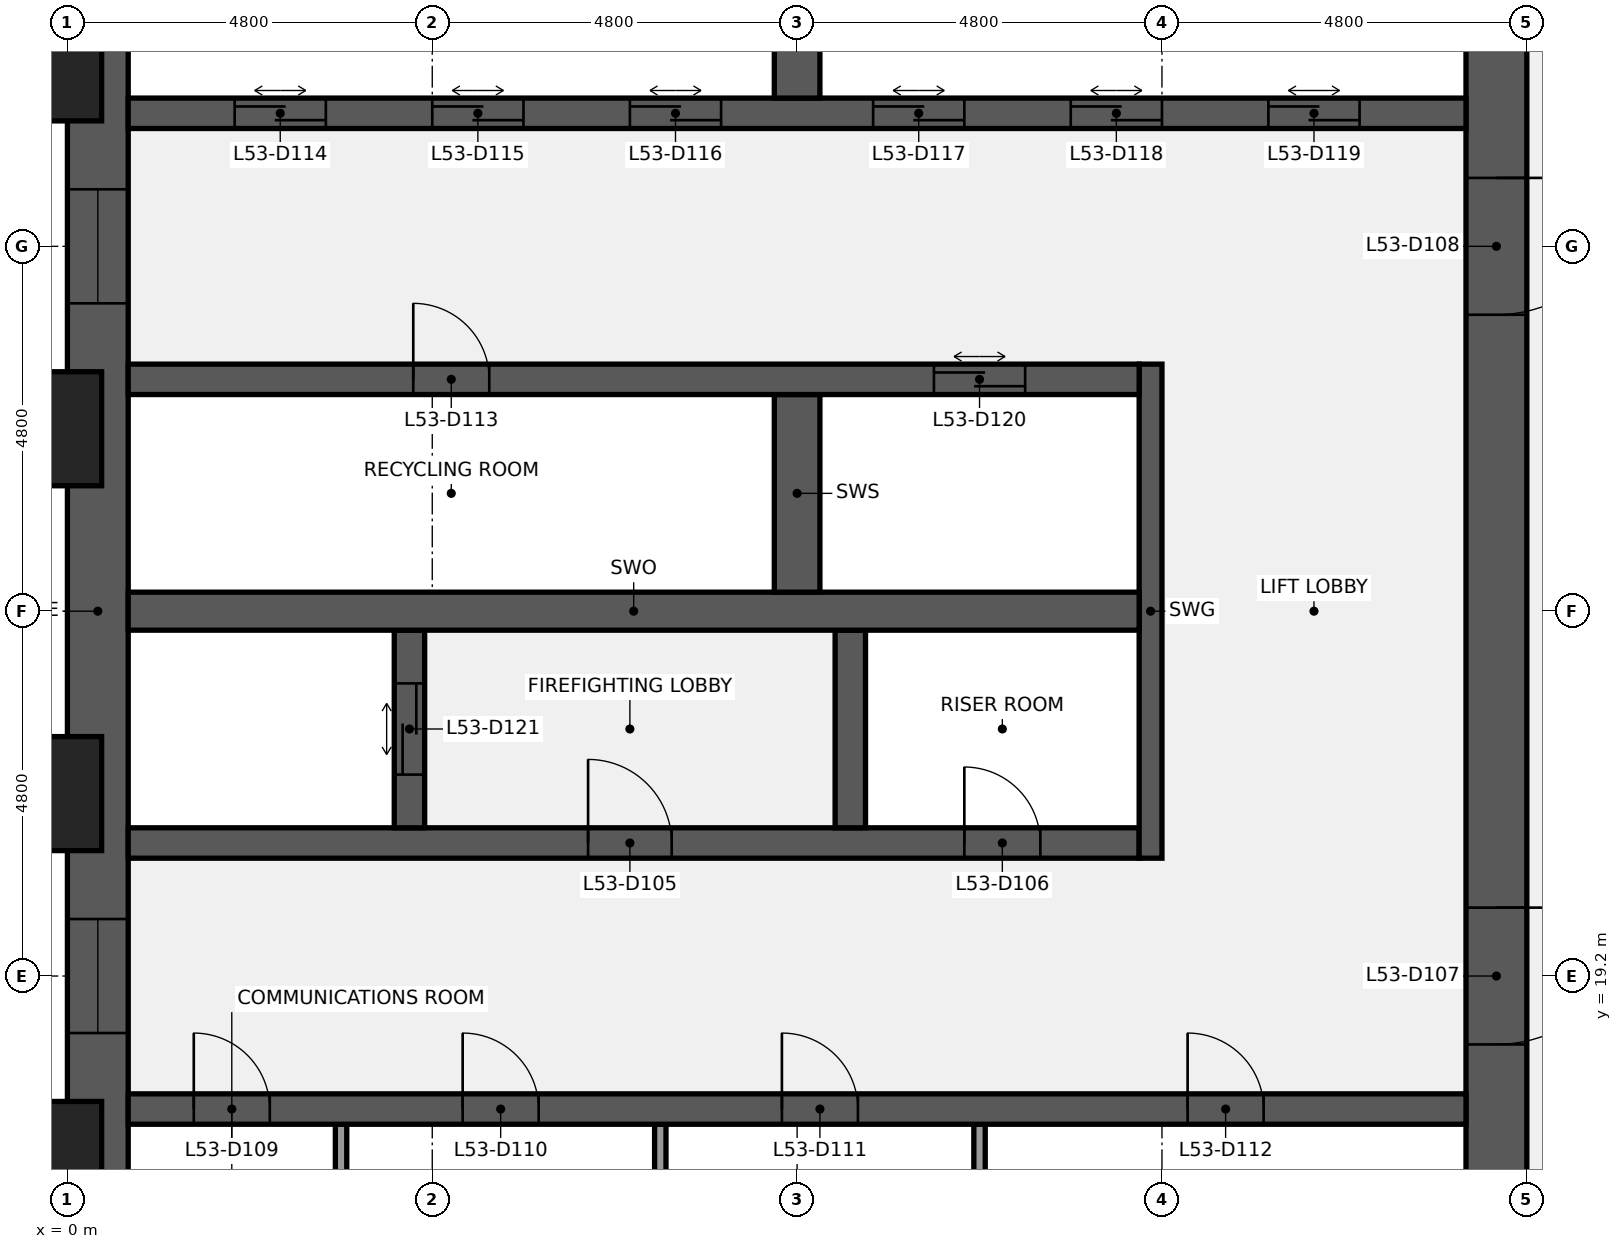
"""IFC4 building model, lengths in metres.
Left out: names, types, materials, properties, quantities, classifications, styles, units other than length and angle.
Written with IfcOpenShell. Run it as: python <this file> out.ifc"""

import sys

from ifc_helpers import new_model, si_unit, direction, frame, frame_2d, origin, origin_2d, place, context, subcontext, project, spatial, rectangle, extrude, element, fill, save


model = new_model("IFC4")
c1 = context("Model", 3, precision=1e-05, world=origin(), true_north=direction((0.0, 1.0)))
c2 = subcontext(c1, "Body", "Model", "MODEL_VIEW")
j1 = project(units=[si_unit("LENGTHUNIT", "METRE"), si_unit("PLANEANGLEUNIT", "RADIAN")], contexts=[c1])
p1 = place(None, origin())
s1 = spatial("IfcSite", under=j1, at=p1, CompositionType="ELEMENT")
p2 = place(p1, origin())
s2 = spatial("IfcBuilding", under=s1, at=p2, CompositionType="ELEMENT")
p3 = place(p2, frame((0.0, 0.0, 241.2)))
s3 = spatial("IfcBuildingStorey", under=s2, at=p3, CompositionType="ELEMENT", Elevation=241.2)
p4 = place(p3, frame((0.4, 9.6, 0.0), z_axis=(0.0, 0.0, 1.0), x_axis=(0.0, 1.0, 0.0)))
e1 = element("IfcWall", 1, at=p4, inside=s3, PredefinedType="SHEAR", context=c2, shape_type="SweptSolid", body=[
    extrude(rectangle(XDim=28.8, YDim=0.8, at=frame_2d((14.4, 0.0))), origin(), (0.0, 0.0, 1.0), 3.84),
])
p5 = place(p4, frame((8.85, 0.0, 0.9)))
e2 = element("IfcOpeningElement", 2, at=p5, cuts=e1, PredefinedType="OPENING", context=c2, shape_type="SweptSolid", body=[
    extrude(rectangle(XDim=1.5, YDim=1.5, at=frame_2d((0.75, 0.75))), frame((0.0, 0.41, 0.0), z_axis=(0.0, -1.0, 0.0), x_axis=(1.0, 0.0, 0.0)), (0.0, 0.0, 1.0), 0.82),
])
p6 = place(p4, frame((18.45, 0.0, 0.9)))
e3 = element("IfcOpeningElement", 3, at=p6, cuts=e1, PredefinedType="OPENING", context=c2, shape_type="SweptSolid", body=[
    extrude(rectangle(XDim=1.5, YDim=1.5, at=frame_2d((0.75, 0.75))), frame((0.0, 0.41, 0.0), z_axis=(0.0, -1.0, 0.0), x_axis=(1.0, 0.0, 0.0)), (0.0, 0.0, 1.0), 0.82),
])
p7 = place(p3, frame((18.8, 38.4, 0.0), z_axis=(0.0, 0.0, 1.0), x_axis=(0.0, -1.0, 0.0)))
e4 = element("IfcWall", 4, at=p7, inside=s3, PredefinedType="SHEAR", context=c2, shape_type="SweptSolid", body=[
    extrude(rectangle(XDim=28.8, YDim=0.8, at=frame_2d((14.4, 0.0))), origin(), (0.0, 0.0, 1.0), 3.84),
])
p8 = place(p7, frame((18.3, 0.0, 0.0)))
e5 = element("IfcOpeningElement", 5, at=p8, cuts=e4, PredefinedType="OPENING", context=c2, shape_type="SweptSolid", body=[
    extrude(rectangle(XDim=1.8, YDim=2.1, at=frame_2d((0.9, 1.05))), frame((0.0, 0.41, 0.0), z_axis=(0.0, -1.0, 0.0), x_axis=(1.0, 0.0, 0.0)), (0.0, 0.0, 1.0), 0.82),
])
p9 = place(p7, frame((8.7, 0.0, 0.0)))
e6 = element("IfcOpeningElement", 6, at=p9, cuts=e4, PredefinedType="OPENING", context=c2, shape_type="SweptSolid", body=[
    extrude(rectangle(XDim=1.8, YDim=2.1, at=frame_2d((0.9, 1.05))), frame((0.0, 0.41, 0.0), z_axis=(0.0, -1.0, 0.0), x_axis=(1.0, 0.0, 0.0)), (0.0, 0.0, 1.0), 0.82),
])
for number, where, z_axis, x_axis in (
    (7, (3.6, 14.65, 0.0), (0.0, 0.0, 1.0), (0.0, 1.0, 0.0)),
    (8, (7.8, 14.65, 0.0), (0.0, 0.0, 1.0), (0.0, 1.0, 0.0)),
    (9, (12.0, 14.65, 0.0), (0.0, 0.0, 1.0), (0.0, 1.0, 0.0)),
):
    element("IfcWall", number, at=place(p3, frame(where, z_axis=z_axis, x_axis=x_axis)), inside=s3, PredefinedType="PARTITIONING", context=c2, shape_type="SweptSolid", body=[
        extrude(rectangle(XDim=2.6, YDim=0.15, at=frame_2d((1.3, 0.0))), origin(), (0.0, 0.0, 1.0), 3.84),
    ])
p10 = place(p3, frame((0.8, 17.45, 0.0), z_axis=(0.0, 0.0, 1.0), x_axis=(1.0, 0.0, 0.0)))
e10 = element("IfcWall", 10, at=p10, inside=s3, PredefinedType="SHEAR", context=c2, shape_type="SweptSolid", body=[
    extrude(rectangle(XDim=17.6, YDim=0.4, at=frame_2d((8.8, 0.0))), origin(), (0.0, 0.0, 1.0), 3.84),
])
p11 = place(p10, frame((0.863, 0.0, 0.0)))
e11 = element("IfcOpeningElement", 11, at=p11, cuts=e10, PredefinedType="OPENING", context=c2, shape_type="SweptSolid", body=[
    extrude(rectangle(XDim=1.0, YDim=2.1, at=frame_2d((0.5, 1.05))), frame((0.0, 0.21, 0.0), z_axis=(0.0, -1.0, 0.0), x_axis=(1.0, 0.0, 0.0)), (0.0, 0.0, 1.0), 0.42),
])
p12 = place(p10, frame((4.4, 0.0, 0.0)))
e12 = element("IfcOpeningElement", 12, at=p12, cuts=e10, PredefinedType="OPENING", context=c2, shape_type="SweptSolid", body=[
    extrude(rectangle(XDim=1.0, YDim=2.1, at=frame_2d((0.5, 1.05))), frame((0.0, 0.21, 0.0), z_axis=(0.0, -1.0, 0.0), x_axis=(1.0, 0.0, 0.0)), (0.0, 0.0, 1.0), 0.42),
])
p13 = place(p10, frame((8.6, 0.0, 0.0)))
e13 = element("IfcOpeningElement", 13, at=p13, cuts=e10, PredefinedType="OPENING", context=c2, shape_type="SweptSolid", body=[
    extrude(rectangle(XDim=1.0, YDim=2.1, at=frame_2d((0.5, 1.05))), frame((0.0, 0.21, 0.0), z_axis=(0.0, -1.0, 0.0), x_axis=(1.0, 0.0, 0.0)), (0.0, 0.0, 1.0), 0.42),
])
p14 = place(p10, frame((13.938, 0.0, 0.0)))
e14 = element("IfcOpeningElement", 14, at=p14, cuts=e10, PredefinedType="OPENING", context=c2, shape_type="SweptSolid", body=[
    extrude(rectangle(XDim=1.0, YDim=2.1, at=frame_2d((0.5, 1.05))), frame((0.0, 0.21, 0.0), z_axis=(0.0, -1.0, 0.0), x_axis=(1.0, 0.0, 0.0)), (0.0, 0.0, 1.0), 0.42),
])
p15 = place(p3, frame((0.8, 20.95, 0.0), z_axis=(0.0, 0.0, 1.0), x_axis=(1.0, 0.0, 0.0)))
e15 = element("IfcWall", 15, at=p15, inside=s3, PredefinedType="SHEAR", context=c2, shape_type="SweptSolid", body=[
    extrude(rectangle(XDim=13.3, YDim=0.4, at=frame_2d((6.65, 0.0))), origin(), (0.0, 0.0, 1.0), 3.84),
])
p16 = place(p15, frame((6.05, 0.0, 0.0)))
e16 = element("IfcOpeningElement", 16, at=p16, cuts=e15, PredefinedType="OPENING", context=c2, shape_type="SweptSolid", body=[
    extrude(rectangle(XDim=1.1, YDim=2.1, at=frame_2d((0.55, 1.05))), frame((0.0, 0.21, 0.0), z_axis=(0.0, -1.0, 0.0), x_axis=(1.0, 0.0, 0.0)), (0.0, 0.0, 1.0), 0.42),
])
p17 = place(p15, frame((11.0, 0.0, 0.0)))
e17 = element("IfcOpeningElement", 17, at=p17, cuts=e15, PredefinedType="OPENING", context=c2, shape_type="SweptSolid", body=[
    extrude(rectangle(XDim=1.0, YDim=2.1, at=frame_2d((0.5, 1.05))), frame((0.0, 0.21, 0.0), z_axis=(0.0, -1.0, 0.0), x_axis=(1.0, 0.0, 0.0)), (0.0, 0.0, 1.0), 0.42),
])
p18 = place(p3, frame((14.25, 20.75, 0.0), z_axis=(0.0, 0.0, 1.0), x_axis=(0.0, 1.0, 0.0)))
e18 = element("IfcWall", 18, at=p18, inside=s3, PredefinedType="SHEAR", context=c2, shape_type="SweptSolid", body=[
    extrude(rectangle(XDim=6.5, YDim=0.3, at=frame_2d((3.25, 0.0))), origin(), (0.0, 0.0, 1.0), 3.84),
])
p19 = place(p3, frame((4.5, 21.15, 0.0), z_axis=(0.0, 0.0, 1.0), x_axis=(0.0, 1.0, 0.0)))
e19 = element("IfcWall", 19, at=p19, inside=s3, PredefinedType="SHEAR", context=c2, shape_type="SweptSolid", body=[
    extrude(rectangle(XDim=2.6, YDim=0.4, at=frame_2d((1.3, 0.0))), origin(), (0.0, 0.0, 1.0), 3.84),
])
p20 = place(p19, frame((0.7, 0.0, 0.0)))
e20 = element("IfcOpeningElement", 20, at=p20, cuts=e19, PredefinedType="OPENING", context=c2, shape_type="SweptSolid", body=[
    extrude(rectangle(XDim=1.2, YDim=2.1, at=frame_2d((0.6, 1.05))), frame((0.0, 0.21, 0.0), z_axis=(0.0, -1.0, 0.0), x_axis=(1.0, 0.0, 0.0)), (0.0, 0.0, 1.0), 0.42),
])
p21 = place(p3, frame((10.3, 21.15, 0.0), z_axis=(0.0, 0.0, 1.0), x_axis=(0.0, 1.0, 0.0)))
e21 = element("IfcWall", 21, at=p21, inside=s3, PredefinedType="SHEAR", context=c2, shape_type="SweptSolid", body=[
    extrude(rectangle(XDim=2.6, YDim=0.4, at=frame_2d((1.3, 0.0))), origin(), (0.0, 0.0, 1.0), 3.84),
])
p22 = place(p3, frame((0.8, 24.0, 0.0), z_axis=(0.0, 0.0, 1.0), x_axis=(1.0, 0.0, 0.0)))
e22 = element("IfcWall", 22, at=p22, inside=s3, PredefinedType="SHEAR", context=c2, shape_type="SweptSolid", body=[
    extrude(rectangle(XDim=13.3, YDim=0.5, at=frame_2d((6.65, 0.0))), origin(), (0.0, 0.0, 1.0), 3.84),
])
p23 = place(p3, frame((9.6, 24.25, 0.0), z_axis=(0.0, 0.0, 1.0), x_axis=(0.0, 1.0, 0.0)))
e23 = element("IfcWall", 23, at=p23, inside=s3, PredefinedType="SHEAR", context=c2, shape_type="SweptSolid", body=[
    extrude(rectangle(XDim=2.6, YDim=0.6, at=frame_2d((1.3, 0.0))), origin(), (0.0, 0.0, 1.0), 3.84),
])
p24 = place(p3, frame((0.8, 27.05, 0.0), z_axis=(0.0, 0.0, 1.0), x_axis=(1.0, 0.0, 0.0)))
e24 = element("IfcWall", 24, at=p24, inside=s3, PredefinedType="SHEAR", context=c2, shape_type="SweptSolid", body=[
    extrude(rectangle(XDim=13.3, YDim=0.4, at=frame_2d((6.65, 0.0))), origin(), (0.0, 0.0, 1.0), 3.84),
])
p25 = place(p24, frame((3.75, 0.0, 0.0)))
e25 = element("IfcOpeningElement", 25, at=p25, cuts=e24, PredefinedType="OPENING", context=c2, shape_type="SweptSolid", body=[
    extrude(rectangle(XDim=1.0, YDim=2.1, at=frame_2d((0.5, 1.05))), frame((0.0, 0.21, 0.0), z_axis=(0.0, -1.0, 0.0), x_axis=(1.0, 0.0, 0.0)), (0.0, 0.0, 1.0), 0.42),
])
p26 = place(p24, frame((10.6, 0.0, 0.0)))
e26 = element("IfcOpeningElement", 26, at=p26, cuts=e24, PredefinedType="OPENING", context=c2, shape_type="SweptSolid", body=[
    extrude(rectangle(XDim=1.2, YDim=2.1, at=frame_2d((0.6, 1.05))), frame((0.0, 0.21, 0.0), z_axis=(0.0, -1.0, 0.0), x_axis=(1.0, 0.0, 0.0)), (0.0, 0.0, 1.0), 0.42),
])
p27 = place(p3, frame((0.8, 30.55, 0.0), z_axis=(0.0, 0.0, 1.0), x_axis=(1.0, 0.0, 0.0)))
e27 = element("IfcWall", 27, at=p27, inside=s3, PredefinedType="SHEAR", context=c2, shape_type="SweptSolid", body=[
    extrude(rectangle(XDim=17.6, YDim=0.4, at=frame_2d((8.8, 0.0))), origin(), (0.0, 0.0, 1.0), 3.84),
])
p28 = place(p27, frame((1.4, 0.0, 0.0)))
e28 = element("IfcOpeningElement", 28, at=p28, cuts=e27, PredefinedType="OPENING", context=c2, shape_type="SweptSolid", body=[
    extrude(rectangle(XDim=1.2, YDim=2.1, at=frame_2d((0.6, 1.05))), frame((0.0, 0.21, 0.0), z_axis=(0.0, -1.0, 0.0), x_axis=(1.0, 0.0, 0.0)), (0.0, 0.0, 1.0), 0.42),
])
p29 = place(p27, frame((4.0, 0.0, 0.0)))
e29 = element("IfcOpeningElement", 29, at=p29, cuts=e27, PredefinedType="OPENING", context=c2, shape_type="SweptSolid", body=[
    extrude(rectangle(XDim=1.2, YDim=2.1, at=frame_2d((0.6, 1.05))), frame((0.0, 0.21, 0.0), z_axis=(0.0, -1.0, 0.0), x_axis=(1.0, 0.0, 0.0)), (0.0, 0.0, 1.0), 0.42),
])
p30 = place(p27, frame((6.6, 0.0, 0.0)))
e30 = element("IfcOpeningElement", 30, at=p30, cuts=e27, PredefinedType="OPENING", context=c2, shape_type="SweptSolid", body=[
    extrude(rectangle(XDim=1.2, YDim=2.1, at=frame_2d((0.6, 1.05))), frame((0.0, 0.21, 0.0), z_axis=(0.0, -1.0, 0.0), x_axis=(1.0, 0.0, 0.0)), (0.0, 0.0, 1.0), 0.42),
])
p31 = place(p27, frame((9.8, 0.0, 0.0)))
e31 = element("IfcOpeningElement", 31, at=p31, cuts=e27, PredefinedType="OPENING", context=c2, shape_type="SweptSolid", body=[
    extrude(rectangle(XDim=1.2, YDim=2.1, at=frame_2d((0.6, 1.05))), frame((0.0, 0.21, 0.0), z_axis=(0.0, -1.0, 0.0), x_axis=(1.0, 0.0, 0.0)), (0.0, 0.0, 1.0), 0.42),
])
p32 = place(p27, frame((12.4, 0.0, 0.0)))
e32 = element("IfcOpeningElement", 32, at=p32, cuts=e27, PredefinedType="OPENING", context=c2, shape_type="SweptSolid", body=[
    extrude(rectangle(XDim=1.2, YDim=2.1, at=frame_2d((0.6, 1.05))), frame((0.0, 0.21, 0.0), z_axis=(0.0, -1.0, 0.0), x_axis=(1.0, 0.0, 0.0)), (0.0, 0.0, 1.0), 0.42),
])
p33 = place(p27, frame((15.0, 0.0, 0.0)))
e33 = element("IfcOpeningElement", 33, at=p33, cuts=e27, PredefinedType="OPENING", context=c2, shape_type="SweptSolid", body=[
    extrude(rectangle(XDim=1.2, YDim=2.1, at=frame_2d((0.6, 1.05))), frame((0.0, 0.21, 0.0), z_axis=(0.0, -1.0, 0.0), x_axis=(1.0, 0.0, 0.0)), (0.0, 0.0, 1.0), 0.42),
])
p34 = place(p3, frame((9.6, 30.75, 0.0), z_axis=(0.0, 0.0, 1.0), x_axis=(0.0, 1.0, 0.0)))
e34 = element("IfcWall", 34, at=p34, inside=s3, PredefinedType="SHEAR", context=c2, shape_type="SweptSolid", body=[
    extrude(rectangle(XDim=2.6, YDim=0.6, at=frame_2d((1.3, 0.0))), origin(), (0.0, 0.0, 1.0), 3.84),
])
for number, where, z_axis, x_axis in (
    (35, (-0.75, 16.8, 0.0), (0.0, 0.0, 1.0), (0.0, 1.0, 0.0)),
    (36, (-0.75, 21.6, 0.0), (0.0, 0.0, 1.0), (0.0, 1.0, 0.0)),
    (37, (-0.75, 26.4, 0.0), (0.0, 0.0, 1.0), (0.0, 1.0, 0.0)),
    (38, (-0.75, 31.2, 0.0), (0.0, 0.0, 1.0), (0.0, 1.0, 0.0)),
):
    element("IfcColumn", number, at=place(p3, frame(where, z_axis=z_axis, x_axis=x_axis)), inside=s3, PredefinedType="PILASTER", context=c2, shape_type="SweptSolid", body=[
        extrude(rectangle(XDim=2.4, YDim=1.5, at=origin_2d()), origin(), (0.0, 0.0, 1.0), 4.0),
    ])
p35 = place(p16, origin())
e39 = element("IfcDoor", 39, at=p35, inside=s3, OperationType="SINGLE_SWING_LEFT", PredefinedType="DOOR", context=c2, shape_type="SweptSolid", body=[
    extrude(rectangle(XDim=1.1, YDim=2.1, at=frame_2d((0.55, 1.05))), frame((0.0, 0.025, 0.0), z_axis=(0.0, -1.0, 0.0), x_axis=(1.0, 0.0, 0.0)), (0.0, 0.0, 1.0), 0.05),
])
fill(e16, e39)
p36 = place(p17, origin())
e40 = element("IfcDoor", 40, at=p36, inside=s3, OperationType="SINGLE_SWING_LEFT", PredefinedType="DOOR", context=c2, shape_type="SweptSolid", body=[
    extrude(rectangle(XDim=1.0, YDim=2.1, at=frame_2d((0.5, 1.05))), frame((0.0, 0.025, 0.0), z_axis=(0.0, -1.0, 0.0), x_axis=(1.0, 0.0, 0.0)), (0.0, 0.0, 1.0), 0.05),
])
fill(e17, e40)
p37 = place(p8, origin())
e41 = element("IfcDoor", 41, at=p37, inside=s3, OperationType="DOUBLE_DOOR_SINGLE_SWING", PredefinedType="DOOR", context=c2, shape_type="SweptSolid", body=[
    extrude(rectangle(XDim=1.8, YDim=2.1, at=frame_2d((0.9, 1.05))), frame((0.0, 0.025, 0.0), z_axis=(0.0, -1.0, 0.0), x_axis=(1.0, 0.0, 0.0)), (0.0, 0.0, 1.0), 0.05),
])
fill(e5, e41)
p38 = place(p9, origin())
e42 = element("IfcDoor", 42, at=p38, inside=s3, OperationType="DOUBLE_DOOR_SINGLE_SWING", PredefinedType="DOOR", context=c2, shape_type="SweptSolid", body=[
    extrude(rectangle(XDim=1.8, YDim=2.1, at=frame_2d((0.9, 1.05))), frame((0.0, 0.025, 0.0), z_axis=(0.0, -1.0, 0.0), x_axis=(1.0, 0.0, 0.0)), (0.0, 0.0, 1.0), 0.05),
])
fill(e6, e42)
p39 = place(p11, origin())
e43 = element("IfcDoor", 43, at=p39, inside=s3, OperationType="SINGLE_SWING_LEFT", PredefinedType="DOOR", context=c2, shape_type="SweptSolid", body=[
    extrude(rectangle(XDim=1.0, YDim=2.1, at=frame_2d((0.5, 1.05))), frame((0.0, 0.025, 0.0), z_axis=(0.0, -1.0, 0.0), x_axis=(1.0, 0.0, 0.0)), (0.0, 0.0, 1.0), 0.05),
])
fill(e11, e43)
p40 = place(p12, origin())
e44 = element("IfcDoor", 44, at=p40, inside=s3, OperationType="SINGLE_SWING_LEFT", PredefinedType="DOOR", context=c2, shape_type="SweptSolid", body=[
    extrude(rectangle(XDim=1.0, YDim=2.1, at=frame_2d((0.5, 1.05))), frame((0.0, 0.025, 0.0), z_axis=(0.0, -1.0, 0.0), x_axis=(1.0, 0.0, 0.0)), (0.0, 0.0, 1.0), 0.05),
])
fill(e12, e44)
p41 = place(p13, origin())
e45 = element("IfcDoor", 45, at=p41, inside=s3, OperationType="SINGLE_SWING_LEFT", PredefinedType="DOOR", context=c2, shape_type="SweptSolid", body=[
    extrude(rectangle(XDim=1.0, YDim=2.1, at=frame_2d((0.5, 1.05))), frame((0.0, 0.025, 0.0), z_axis=(0.0, -1.0, 0.0), x_axis=(1.0, 0.0, 0.0)), (0.0, 0.0, 1.0), 0.05),
])
fill(e13, e45)
p42 = place(p14, origin())
e46 = element("IfcDoor", 46, at=p42, inside=s3, OperationType="SINGLE_SWING_LEFT", PredefinedType="DOOR", context=c2, shape_type="SweptSolid", body=[
    extrude(rectangle(XDim=1.0, YDim=2.1, at=frame_2d((0.5, 1.05))), frame((0.0, 0.025, 0.0), z_axis=(0.0, -1.0, 0.0), x_axis=(1.0, 0.0, 0.0)), (0.0, 0.0, 1.0), 0.05),
])
fill(e14, e46)
p43 = place(p25, origin())
e47 = element("IfcDoor", 47, at=p43, inside=s3, OperationType="SINGLE_SWING_LEFT", PredefinedType="DOOR", context=c2, shape_type="SweptSolid", body=[
    extrude(rectangle(XDim=1.0, YDim=2.1, at=frame_2d((0.5, 1.05))), frame((0.0, 0.025, 0.0), z_axis=(0.0, -1.0, 0.0), x_axis=(1.0, 0.0, 0.0)), (0.0, 0.0, 1.0), 0.05),
])
fill(e25, e47)
p44 = place(p28, origin())
e48 = element("IfcDoor", 48, at=p44, inside=s3, OperationType="DOUBLE_DOOR_SLIDING", PredefinedType="DOOR", context=c2, shape_type="SweptSolid", body=[
    extrude(rectangle(XDim=1.2, YDim=2.1, at=frame_2d((0.6, 1.05))), frame((0.0, 0.025, 0.0), z_axis=(0.0, -1.0, 0.0), x_axis=(1.0, 0.0, 0.0)), (0.0, 0.0, 1.0), 0.05),
])
fill(e28, e48)
p45 = place(p29, origin())
e49 = element("IfcDoor", 49, at=p45, inside=s3, OperationType="DOUBLE_DOOR_SLIDING", PredefinedType="DOOR", context=c2, shape_type="SweptSolid", body=[
    extrude(rectangle(XDim=1.2, YDim=2.1, at=frame_2d((0.6, 1.05))), frame((0.0, 0.025, 0.0), z_axis=(0.0, -1.0, 0.0), x_axis=(1.0, 0.0, 0.0)), (0.0, 0.0, 1.0), 0.05),
])
fill(e29, e49)
p46 = place(p30, origin())
e50 = element("IfcDoor", 50, at=p46, inside=s3, OperationType="DOUBLE_DOOR_SLIDING", PredefinedType="DOOR", context=c2, shape_type="SweptSolid", body=[
    extrude(rectangle(XDim=1.2, YDim=2.1, at=frame_2d((0.6, 1.05))), frame((0.0, 0.025, 0.0), z_axis=(0.0, -1.0, 0.0), x_axis=(1.0, 0.0, 0.0)), (0.0, 0.0, 1.0), 0.05),
])
fill(e30, e50)
p47 = place(p31, origin())
e51 = element("IfcDoor", 51, at=p47, inside=s3, OperationType="DOUBLE_DOOR_SLIDING", PredefinedType="DOOR", context=c2, shape_type="SweptSolid", body=[
    extrude(rectangle(XDim=1.2, YDim=2.1, at=frame_2d((0.6, 1.05))), frame((0.0, 0.025, 0.0), z_axis=(0.0, -1.0, 0.0), x_axis=(1.0, 0.0, 0.0)), (0.0, 0.0, 1.0), 0.05),
])
fill(e31, e51)
p48 = place(p32, origin())
e52 = element("IfcDoor", 52, at=p48, inside=s3, OperationType="DOUBLE_DOOR_SLIDING", PredefinedType="DOOR", context=c2, shape_type="SweptSolid", body=[
    extrude(rectangle(XDim=1.2, YDim=2.1, at=frame_2d((0.6, 1.05))), frame((0.0, 0.025, 0.0), z_axis=(0.0, -1.0, 0.0), x_axis=(1.0, 0.0, 0.0)), (0.0, 0.0, 1.0), 0.05),
])
fill(e32, e52)
p49 = place(p33, origin())
e53 = element("IfcDoor", 53, at=p49, inside=s3, OperationType="DOUBLE_DOOR_SLIDING", PredefinedType="DOOR", context=c2, shape_type="SweptSolid", body=[
    extrude(rectangle(XDim=1.2, YDim=2.1, at=frame_2d((0.6, 1.05))), frame((0.0, 0.025, 0.0), z_axis=(0.0, -1.0, 0.0), x_axis=(1.0, 0.0, 0.0)), (0.0, 0.0, 1.0), 0.05),
])
fill(e33, e53)
p50 = place(p26, origin())
e54 = element("IfcDoor", 54, at=p50, inside=s3, OperationType="DOUBLE_DOOR_SLIDING", PredefinedType="DOOR", context=c2, shape_type="SweptSolid", body=[
    extrude(rectangle(XDim=1.2, YDim=2.1, at=frame_2d((0.6, 1.05))), frame((0.0, 0.025, 0.0), z_axis=(0.0, -1.0, 0.0), x_axis=(1.0, 0.0, 0.0)), (0.0, 0.0, 1.0), 0.05),
])
fill(e26, e54)
p51 = place(p20, origin())
e55 = element("IfcDoor", 55, at=p51, inside=s3, OperationType="DOUBLE_DOOR_SLIDING", PredefinedType="DOOR", context=c2, shape_type="SweptSolid", body=[
    extrude(rectangle(XDim=1.2, YDim=2.1, at=frame_2d((0.6, 1.05))), frame((0.0, 0.025, 0.0), z_axis=(0.0, -1.0, 0.0), x_axis=(1.0, 0.0, 0.0)), (0.0, 0.0, 1.0), 0.05),
])
fill(e20, e55)
p52 = place(p5, origin())
e56 = element("IfcWindow", 56, at=p52, inside=s3, PartitioningType="SINGLE_PANEL", PredefinedType="WINDOW", context=c2, shape_type="SweptSolid", body=[
    extrude(rectangle(XDim=1.5, YDim=1.5, at=frame_2d((0.75, 0.75))), frame((0.0, 0.03, 0.0), z_axis=(0.0, -1.0, 0.0), x_axis=(1.0, 0.0, 0.0)), (0.0, 0.0, 1.0), 0.06),
])
fill(e2, e56)
p53 = place(p6, origin())
e57 = element("IfcWindow", 57, at=p53, inside=s3, PartitioningType="SINGLE_PANEL", PredefinedType="WINDOW", context=c2, shape_type="SweptSolid", body=[
    extrude(rectangle(XDim=1.5, YDim=1.5, at=frame_2d((0.75, 0.75))), frame((0.0, 0.03, 0.0), z_axis=(0.0, -1.0, 0.0), x_axis=(1.0, 0.0, 0.0)), (0.0, 0.0, 1.0), 0.06),
])
fill(e3, e57)
save(model, sys.argv[1])
